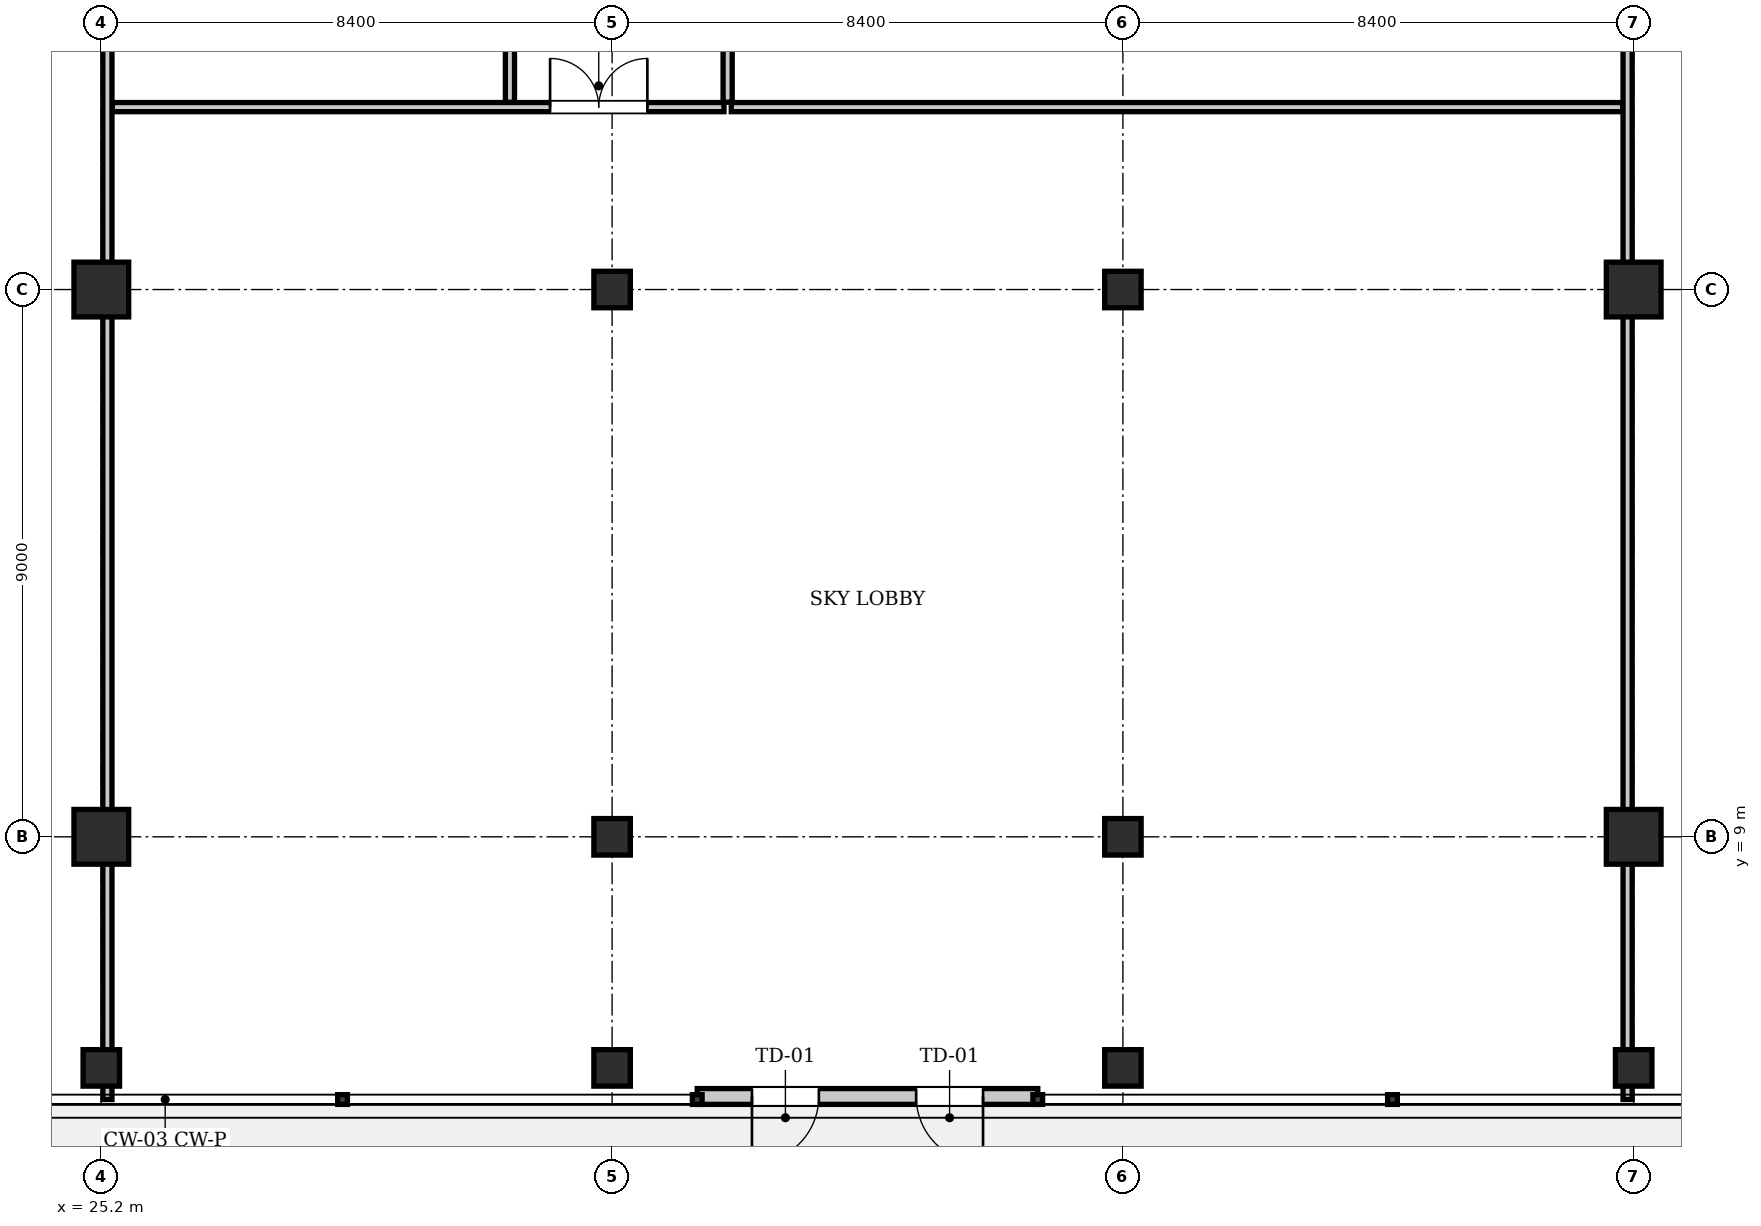
"""IFC4 building model, lengths in metres.
Left out: names, types, materials, properties, quantities, classifications, styles, units other than length and angle.
Written with IfcOpenShell. Run it as: python <this file> out.ifc"""

import sys

from ifc_helpers import new_model, si_unit, direction, frame, frame_2d, origin, origin_2d, place, context, subcontext, project, spatial, rectangle, i_section, extrude, element, fill, save


model = new_model("IFC4")
c1 = context("Model", 3, precision=1e-05, world=origin(), true_north=direction((0.0, 1.0)))
c2 = subcontext(c1, "Body", "Model", "MODEL_VIEW")
j1 = project(units=[si_unit("LENGTHUNIT", "METRE"), si_unit("PLANEANGLEUNIT", "RADIAN")], contexts=[c1])
p1 = place(None, origin())
s1 = spatial("IfcSite", under=j1, at=p1, CompositionType="ELEMENT")
p2 = place(p1, origin())
s2 = spatial("IfcBuilding", under=s1, at=p2, CompositionType="ELEMENT")
p3 = place(p2, frame((0.0, 0.0, 122.5)))
s3 = spatial("IfcBuildingStorey", under=s2, at=p3, CompositionType="ELEMENT", Elevation=122.5)
for number, where, z_axis, x_axis in (
    (1, (25.2, 18.0, 0.0), (0.0, 0.0, 1.0), (1.0, 0.0, 0.0)),
    (2, (50.4, 18.0, 0.0), (0.0, 0.0, 1.0), (1.0, 0.0, 0.0)),
    (3, (25.2, 9.0, 0.0), (0.0, 0.0, 1.0), (1.0, 0.0, 0.0)),
    (4, (50.4, 9.0, 0.0), (0.0, 0.0, 1.0), (1.0, 0.0, 0.0)),
):
    element("IfcColumn", number, at=place(p3, frame(where, z_axis=z_axis, x_axis=x_axis)), inside=s3, PredefinedType="COLUMN", context=c2, shape_type="SweptSolid", body=[
        extrude(rectangle(XDim=0.9, YDim=0.9, at=origin_2d()), origin(), (0.0, 0.0, 1.0), 4.9),
    ])
for number, where, z_axis, x_axis in (
    (5, (33.6, 9.0, 0.0), (0.0, 0.0, 1.0), (1.0, 0.0, 0.0)),
    (6, (42.0, 9.0, 0.0), (0.0, 0.0, 1.0), (1.0, 0.0, 0.0)),
    (7, (33.6, 18.0, 0.0), (0.0, 0.0, 1.0), (1.0, 0.0, 0.0)),
    (8, (42.0, 18.0, 0.0), (0.0, 0.0, 1.0), (1.0, 0.0, 0.0)),
):
    element("IfcColumn", number, at=place(p3, frame(where, z_axis=z_axis, x_axis=x_axis)), inside=s3, PredefinedType="COLUMN", context=c2, shape_type="SweptSolid", body=[
        extrude(i_section(OverallWidth=0.6, OverallDepth=0.6, WebThickness=0.025, FlangeThickness=0.038, at=origin_2d()), origin(), (0.0, 0.0, 1.0), 4.9),
    ])
for number, where, z_axis, x_axis in (
    (9, (25.2, 5.2, -0.24), (0.0, 0.0, 1.0), (1.0, 0.0, 0.0)),
    (10, (33.6, 5.2, -0.24), (0.0, 0.0, 1.0), (1.0, 0.0, 0.0)),
    (11, (42.0, 5.2, -0.24), (0.0, 0.0, 1.0), (1.0, 0.0, 0.0)),
    (12, (50.4, 5.2, -0.24), (0.0, 0.0, 1.0), (1.0, 0.0, 0.0)),
):
    element("IfcColumn", number, at=place(p3, frame(where, z_axis=z_axis, x_axis=x_axis)), inside=s3, PredefinedType="COLUMN", context=c2, shape_type="SweptSolid", body=[
        extrude(i_section(OverallWidth=0.6, OverallDepth=0.6, WebThickness=0.025, FlangeThickness=0.038, at=origin_2d()), origin(), (0.0, 0.0, 1.0), 5.14),
    ])
p4 = place(p3, frame((40.6, 4.73, 0.0), z_axis=(0.0, 0.0, 1.0), x_axis=(-1.0, 0.0, 0.0)))
e13 = element("IfcWall", 13, at=p4, inside=s3, PredefinedType="SOLIDWALL", context=c2, shape_type="SweptSolid", body=[
    extrude(rectangle(XDim=5.6, YDim=0.26, at=frame_2d((2.8, 0.0))), origin(), (0.0, 0.0, 1.0), 4.66),
])
p5 = place(p4, frame((0.9, 0.0, 0.0)))
e14 = element("IfcOpeningElement", 14, at=p5, cuts=e13, PredefinedType="OPENING", context=c2, shape_type="SweptSolid", body=[
    extrude(rectangle(XDim=1.1, YDim=2.2, at=frame_2d((0.55, 1.1))), frame((0.0, 0.14, 0.0), z_axis=(0.0, -1.0, 0.0), x_axis=(1.0, 0.0, 0.0)), (0.0, 0.0, 1.0), 0.28),
])
p6 = place(p4, frame((3.6, 0.0, 0.0)))
e15 = element("IfcOpeningElement", 15, at=p6, cuts=e13, PredefinedType="OPENING", context=c2, shape_type="SweptSolid", body=[
    extrude(rectangle(XDim=1.1, YDim=2.2, at=frame_2d((0.55, 1.1))), frame((0.0, 0.14, 0.0), z_axis=(0.0, -1.0, 0.0), x_axis=(1.0, 0.0, 0.0)), (0.0, 0.0, 1.0), 0.28),
])
p7 = place(p3, frame((25.38, 21.0, 0.0), z_axis=(0.0, 0.0, 1.0), x_axis=(1.0, 0.0, 0.0)))
e16 = element("IfcWall", 16, at=p7, inside=s3, PredefinedType="PARTITIONING", context=c2, shape_type="SweptSolid", body=[
    extrude(rectangle(XDim=10.06, YDim=0.15, at=frame_2d((5.03, 0.0))), origin(), (0.0, 0.0, 1.0), 4.66),
])
p8 = place(p7, frame((7.2, 0.0, 0.0)))
e17 = element("IfcOpeningElement", 17, at=p8, cuts=e16, PredefinedType="OPENING", context=c2, shape_type="SweptSolid", body=[
    extrude(rectangle(XDim=1.6, YDim=2.3, at=frame_2d((0.8, 1.15))), frame((0.0, 0.085, 0.0), z_axis=(0.0, -1.0, 0.0), x_axis=(1.0, 0.0, 0.0)), (0.0, 0.0, 1.0), 0.17),
])
p9 = place(p3, frame((35.56, 21.0, 0.0), z_axis=(0.0, 0.0, 1.0), x_axis=(1.0, 0.0, 0.0)))
e18 = element("IfcWall", 18, at=p9, inside=s3, PredefinedType="PARTITIONING", context=c2, shape_type="SweptSolid", body=[
    extrude(rectangle(XDim=14.66, YDim=0.15, at=frame_2d((7.33, 0.0))), origin(), (0.0, 0.0, 1.0), 4.66),
])
p10 = place(p3, frame((35.5, 21.08, 0.0), z_axis=(0.0, 0.0, 1.0), x_axis=(0.0, 1.0, 0.0)))
e19 = element("IfcWall", 19, at=p10, inside=s3, PredefinedType="PARTITIONING", context=c2, shape_type="SweptSolid", body=[
    extrude(rectangle(XDim=11.6, YDim=0.15, at=frame_2d((5.8, 0.0))), origin(), (0.0, 0.0, 1.0), 4.66),
])
p11 = place(p3, frame((31.92, 21.08, 0.0), z_axis=(0.0, 0.0, 1.0), x_axis=(0.0, 1.0, 0.0)))
e20 = element("IfcWall", 20, at=p11, inside=s3, PredefinedType="PARTITIONING", context=c2, shape_type="SweptSolid", body=[
    extrude(rectangle(XDim=8.28, YDim=0.15, at=frame_2d((4.14, 0.0))), origin(), (0.0, 0.0, 1.0), 4.66),
])
p12 = place(p11, frame((3.69, 0.0, 0.0)))
e21 = element("IfcOpeningElement", 21, at=p12, cuts=e20, PredefinedType="OPENING", context=c2, shape_type="SweptSolid", body=[
    extrude(rectangle(XDim=0.9, YDim=2.1, at=frame_2d((0.45, 1.05))), frame((0.0, 0.085, 0.0), z_axis=(0.0, -1.0, 0.0), x_axis=(1.0, 0.0, 0.0)), (0.0, 0.0, 1.0), 0.17),
])
for number, where, z_axis, x_axis in (
    (22, (25.3, 4.68, 0.0), (0.0, 0.0, 1.0), (0.0, 1.0, 0.0)),
    (23, (50.3, 4.68, 0.0), (0.0, 0.0, 1.0), (0.0, 1.0, 0.0)),
):
    element("IfcWall", number, at=place(p3, frame(where, z_axis=z_axis, x_axis=x_axis)), inside=s3, PredefinedType="PARTITIONING", context=c2, shape_type="SweptSolid", body=[
        extrude(rectangle(XDim=28.04, YDim=0.15, at=frame_2d((14.02, 0.0))), origin(), (0.0, 0.0, 1.0), 4.048),
    ])
p13 = place(p5, origin())
e24 = element("IfcDoor", 24, at=p13, inside=s3, OperationType="SINGLE_SWING_LEFT", PredefinedType="DOOR", context=c2, shape_type="SweptSolid", body=[
    extrude(rectangle(XDim=1.1, YDim=2.2, at=frame_2d((0.55, 1.1))), frame((0.0, 0.025, 0.0), z_axis=(0.0, -1.0, 0.0), x_axis=(1.0, 0.0, 0.0)), (0.0, 0.0, 1.0), 0.05),
])
fill(e14, e24)
p14 = place(p6, origin())
e25 = element("IfcDoor", 25, at=p14, inside=s3, OperationType="SINGLE_SWING_RIGHT", PredefinedType="DOOR", context=c2, shape_type="SweptSolid", body=[
    extrude(rectangle(XDim=1.1, YDim=2.2, at=frame_2d((0.55, 1.1))), frame((0.0, 0.025, 0.0), z_axis=(0.0, -1.0, 0.0), x_axis=(1.0, 0.0, 0.0)), (0.0, 0.0, 1.0), 0.05),
])
fill(e15, e25)
p15 = place(p8, origin())
e26 = element("IfcDoor", 26, at=p15, inside=s3, OperationType="DOUBLE_DOOR_SINGLE_SWING", PredefinedType="DOOR", context=c2, shape_type="SweptSolid", body=[
    extrude(rectangle(XDim=1.6, YDim=2.3, at=frame_2d((0.8, 1.15))), frame((0.0, 0.025, 0.0), z_axis=(0.0, -1.0, 0.0), x_axis=(1.0, 0.0, 0.0)), (0.0, 0.0, 1.0), 0.05),
])
fill(e17, e26)
save(model, sys.argv[1])
